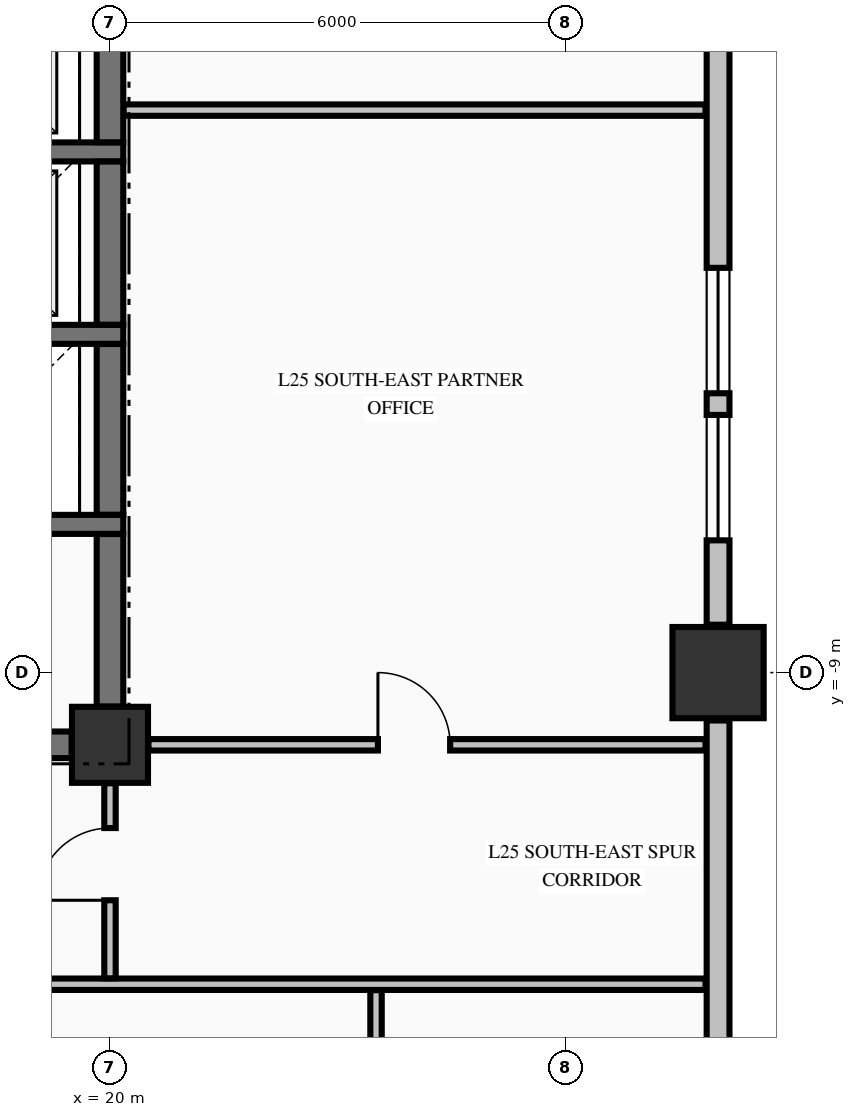
"""IFC4 building model, lengths in metres.
Left out: names, types, materials, properties, quantities, classifications, styles, units other than length and angle.
Written with IfcOpenShell. Run it as: python <this file> out.ifc"""

import sys

from ifc_helpers import new_model, si_unit, direction, frame, frame_2d, origin, origin_2d, place, context, subcontext, project, spatial, rectangle, extrude, element, fill, save


model = new_model("IFC4")
c1 = context("Model", 3, precision=1e-05, world=origin(), true_north=direction((0.0, 1.0)))
c2 = subcontext(c1, "Body", "Model", "MODEL_VIEW")
j1 = project(units=[si_unit("LENGTHUNIT", "METRE"), si_unit("PLANEANGLEUNIT", "RADIAN")], contexts=[c1])
p1 = place(None, origin())
s1 = spatial("IfcSite", under=j1, at=p1, CompositionType="ELEMENT")
p2 = place(p1, origin())
s2 = spatial("IfcBuilding", under=s1, at=p2, CompositionType="ELEMENT")
p3 = place(p2, frame((0.0, 0.0, 102.07)))
s3 = spatial("IfcBuildingStorey", under=s2, at=p3, CompositionType="ELEMENT", Elevation=102.07)
p4 = place(p3, frame((28.0, -9.0, -0.25), z_axis=(0.0, 0.0, 1.0), x_axis=(1.0, 0.0, 0.0)))
e1 = element("IfcColumn", 1, at=p4, inside=s3, PredefinedType="COLUMN", context=c2, shape_type="SweptSolid", body=[
    extrude(rectangle(XDim=1.2, YDim=1.2, at=origin_2d()), origin(), (0.0, 0.0, 1.0), 3.57),
])
p5 = place(p3, frame((20.0, -9.95, -0.25), z_axis=(0.0, 0.0, 1.0), x_axis=(1.0, 0.0, 0.0)))
e2 = element("IfcColumn", 2, at=p5, inside=s3, PredefinedType="COLUMN", context=c2, shape_type="SweptSolid", body=[
    extrude(rectangle(XDim=1.0, YDim=1.0, at=origin_2d()), origin(), (0.0, 0.0, 1.0), 3.57),
])
p6 = place(p3, frame((28.0, -20.37, 0.0), z_axis=(0.0, 0.0, 1.0), x_axis=(0.0, 1.0, 0.0)))
e3 = element("IfcWall", 3, at=p6, inside=s3, PredefinedType="STANDARD", context=c2, shape_type="SweptSolid", body=[
    extrude(rectangle(XDim=10.74, YDim=0.3, at=frame_2d((5.37, 0.0))), origin(), (0.0, 0.0, 1.0), 2.712),
])
p7 = place(p3, frame((28.0, -8.37, 0.0), z_axis=(0.0, 0.0, 1.0), x_axis=(0.0, 1.0, 0.0)))
e4 = element("IfcWall", 4, at=p7, inside=s3, PredefinedType="STANDARD", context=c2, shape_type="SweptSolid", body=[
    extrude(rectangle(XDim=7.74, YDim=0.3, at=frame_2d((3.87, 0.0))), origin(), (0.0, 0.0, 1.0), 2.712),
])
p8 = place(p7, frame((1.11, 0.0, 0.8)))
e5 = element("IfcOpeningElement", 5, at=p8, cuts=e4, PredefinedType="OPENING", context=c2, shape_type="SweptSolid", body=[
    extrude(rectangle(XDim=1.65, YDim=1.7, at=frame_2d((0.825, 0.85))), frame((0.0, 0.16, 0.0), z_axis=(0.0, -1.0, 0.0), x_axis=(1.0, 0.0, 0.0)), (0.0, 0.0, 1.0), 0.32),
])
p9 = place(p7, frame((3.045, 0.0, 0.8)))
e6 = element("IfcOpeningElement", 6, at=p9, cuts=e4, PredefinedType="OPENING", context=c2, shape_type="SweptSolid", body=[
    extrude(rectangle(XDim=1.65, YDim=1.7, at=frame_2d((0.825, 0.85))), frame((0.0, 0.16, 0.0), z_axis=(0.0, -1.0, 0.0), x_axis=(1.0, 0.0, 0.0)), (0.0, 0.0, 1.0), 0.32),
])
p10 = place(p3, frame((14.7, -9.95, 0.0), z_axis=(0.0, 0.0, 1.0), x_axis=(1.0, 0.0, 0.0)))
e7 = element("IfcWall", 7, at=p10, inside=s3, PredefinedType="SHEAR", context=c2, shape_type="SweptSolid", body=[
    extrude(rectangle(XDim=4.796, YDim=0.35, at=frame_2d((2.398, 0.0))), origin(), (0.0, 0.0, 1.0), 3.32),
])
p11 = place(p10, frame((0.65, 0.0, 0.0)))
e8 = element("IfcOpeningElement", 8, at=p11, cuts=e7, PredefinedType="OPENING", context=c2, shape_type="SweptSolid", body=[
    extrude(rectangle(XDim=1.2, YDim=2.15, at=frame_2d((0.6, 1.075))), frame((0.0, 0.185, 0.0), z_axis=(0.0, -1.0, 0.0), x_axis=(1.0, 0.0, 0.0)), (0.0, 0.0, 1.0), 0.37),
])
for number, where, z_axis, x_axis in (
    (9, (17.025, -7.05, 0.0), (0.0, 0.0, 1.0), (1.0, 0.0, 0.0)),
    (10, (17.025, -4.55, 0.0), (0.0, 0.0, 1.0), (1.0, 0.0, 0.0)),
    (11, (17.025, -2.15, 0.0), (0.0, 0.0, 1.0), (1.0, 0.0, 0.0)),
):
    element("IfcWall", number, at=place(p3, frame(where, z_axis=z_axis, x_axis=x_axis)), inside=s3, PredefinedType="SOLIDWALL", context=c2, shape_type="SweptSolid", body=[
        extrude(rectangle(XDim=3.15, YDim=0.25, at=frame_2d((1.575, 0.0))), origin(), (0.0, 0.0, 1.0), 3.32),
    ])
p12 = place(p3, frame((-22.835, -13.1, 0.0), z_axis=(0.0, 0.0, 1.0), x_axis=(1.0, 0.0, 0.0)))
e12 = element("IfcWall", 12, at=p12, inside=s3, PredefinedType="PARTITIONING", context=c2, shape_type="SweptSolid", body=[
    extrude(rectangle(XDim=50.67, YDim=0.15, at=frame_2d((25.335, 0.0))), origin(), (0.0, 0.0, 1.0), 3.32),
])
p13 = place(p12, frame((8.96, 0.0, 0.0)))
e13 = element("IfcOpeningElement", 13, at=p13, cuts=e12, PredefinedType="OPENING", context=c2, shape_type="SweptSolid", body=[
    extrude(rectangle(XDim=1.05, YDim=2.15, at=frame_2d((0.525, 1.075))), frame((0.0, 0.085, 0.0), z_axis=(0.0, -1.0, 0.0), x_axis=(1.0, 0.0, 0.0)), (0.0, 0.0, 1.0), 0.17),
])
p14 = place(p12, frame((20.61, 0.0, 0.0)))
e14 = element("IfcOpeningElement", 14, at=p14, cuts=e12, PredefinedType="OPENING", context=c2, shape_type="SweptSolid", body=[
    extrude(rectangle(XDim=1.05, YDim=2.15, at=frame_2d((0.525, 1.075))), frame((0.0, 0.085, 0.0), z_axis=(0.0, -1.0, 0.0), x_axis=(1.0, 0.0, 0.0)), (0.0, 0.0, 1.0), 0.17),
])
p15 = place(p12, frame((28.76, 0.0, 0.0)))
e15 = element("IfcOpeningElement", 15, at=p15, cuts=e12, PredefinedType="OPENING", context=c2, shape_type="SweptSolid", body=[
    extrude(rectangle(XDim=1.05, YDim=2.15, at=frame_2d((0.525, 1.075))), frame((0.0, 0.085, 0.0), z_axis=(0.0, -1.0, 0.0), x_axis=(1.0, 0.0, 0.0)), (0.0, 0.0, 1.0), 0.17),
])
p16 = place(p3, frame((20.506, -9.95, 0.0), z_axis=(0.0, 0.0, 1.0), x_axis=(1.0, 0.0, 0.0)))
e16 = element("IfcWall", 16, at=p16, inside=s3, PredefinedType="PARTITIONING", context=c2, shape_type="SweptSolid", body=[
    extrude(rectangle(XDim=7.329, YDim=0.15, at=frame_2d((3.665, 0.0))), origin(), (0.0, 0.0, 1.0), 3.32),
])
p17 = place(p16, frame((3.019, 0.0, 0.0)))
e17 = element("IfcOpeningElement", 17, at=p17, cuts=e16, PredefinedType="OPENING", context=c2, shape_type="SweptSolid", body=[
    extrude(rectangle(XDim=0.95, YDim=2.15, at=frame_2d((0.475, 1.075))), frame((0.0, 0.085, 0.0), z_axis=(0.0, -1.0, 0.0), x_axis=(1.0, 0.0, 0.0)), (0.0, 0.0, 1.0), 0.17),
])
p18 = place(p3, frame((20.178, -1.6, 0.0), z_axis=(0.0, 0.0, 1.0), x_axis=(1.0, 0.0, 0.0)))
e18 = element("IfcWall", 18, at=p18, inside=s3, PredefinedType="PARTITIONING", context=c2, shape_type="SweptSolid", body=[
    extrude(rectangle(XDim=7.657, YDim=0.15, at=frame_2d((3.829, 0.0))), origin(), (0.0, 0.0, 1.0), 3.32),
])
p19 = place(p3, frame((20.0, -9.446, 0.0), z_axis=(0.0, 0.0, 1.0), x_axis=(0.0, 1.0, 0.0)))
e19 = element("IfcWall", 19, at=p19, inside=s3, PredefinedType="SHEAR", context=c2, shape_type="SweptSolid", body=[
    extrude(rectangle(XDim=2.269, YDim=0.35, at=frame_2d((1.135, 0.0))), origin(), (0.0, 0.0, 1.0), 3.32),
])
p20 = place(p3, frame((20.0, -6.923, 0.0), z_axis=(0.0, 0.0, 1.0), x_axis=(0.0, 1.0, 0.0)))
e20 = element("IfcWall", 20, at=p20, inside=s3, PredefinedType="SHEAR", context=c2, shape_type="SweptSolid", body=[
    extrude(rectangle(XDim=2.246, YDim=0.35, at=frame_2d((1.123, 0.0))), origin(), (0.0, 0.0, 1.0), 3.32),
])
p21 = place(p3, frame((20.0, -4.423, 0.0), z_axis=(0.0, 0.0, 1.0), x_axis=(0.0, 1.0, 0.0)))
e21 = element("IfcWall", 21, at=p21, inside=s3, PredefinedType="SHEAR", context=c2, shape_type="SweptSolid", body=[
    extrude(rectangle(XDim=2.146, YDim=0.35, at=frame_2d((1.073, 0.0))), origin(), (0.0, 0.0, 1.0), 3.32),
])
p22 = place(p3, frame((20.0, -2.023, 0.0), z_axis=(0.0, 0.0, 1.0), x_axis=(0.0, 1.0, 0.0)))
e22 = element("IfcWall", 22, at=p22, inside=s3, PredefinedType="SHEAR", context=c2, shape_type="SweptSolid", body=[
    extrude(rectangle(XDim=1.519, YDim=0.35, at=frame_2d((0.76, 0.0))), origin(), (0.0, 0.0, 1.0), 3.32),
])
p23 = place(p3, frame((20.0, -13.022, 0.0), z_axis=(0.0, 0.0, 1.0), x_axis=(0.0, 1.0, 0.0)))
e23 = element("IfcWall", 23, at=p23, inside=s3, PredefinedType="PARTITIONING", context=c2, shape_type="SweptSolid", body=[
    extrude(rectangle(XDim=2.566, YDim=0.15, at=frame_2d((1.283, 0.0))), origin(), (0.0, 0.0, 1.0), 2.81),
])
p24 = place(p23, frame((1.027, 0.0, 0.0)))
e24 = element("IfcOpeningElement", 24, at=p24, cuts=e23, PredefinedType="OPENING", context=c2, shape_type="SweptSolid", body=[
    extrude(rectangle(XDim=0.95, YDim=2.15, at=frame_2d((0.475, 1.075))), frame((0.0, 0.085, 0.0), z_axis=(0.0, -1.0, 0.0), x_axis=(1.0, 0.0, 0.0)), (0.0, 0.0, 1.0), 0.17),
])
p25 = place(p3, frame((23.5, -20.394, 0.0), z_axis=(0.0, 0.0, 1.0), x_axis=(0.0, 1.0, 0.0)))
e25 = element("IfcWall", 25, at=p25, inside=s3, PredefinedType="PARTITIONING", context=c2, shape_type="SweptSolid", body=[
    extrude(rectangle(XDim=7.216, YDim=0.15, at=frame_2d((3.608, 0.0))), origin(), (0.0, 0.0, 1.0), 3.32),
])
p26 = place(p8, origin())
e26 = element("IfcWindow", 26, at=p26, inside=s3, PartitioningType="SINGLE_PANEL", PredefinedType="WINDOW", context=c2, shape_type="SweptSolid", body=[
    extrude(rectangle(XDim=1.65, YDim=1.7, at=frame_2d((0.825, 0.85))), frame((0.0, 0.03, 0.0), z_axis=(0.0, -1.0, 0.0), x_axis=(1.0, 0.0, 0.0)), (0.0, 0.0, 1.0), 0.06),
])
fill(e5, e26)
p27 = place(p9, origin())
e27 = element("IfcWindow", 27, at=p27, inside=s3, PartitioningType="SINGLE_PANEL", PredefinedType="WINDOW", context=c2, shape_type="SweptSolid", body=[
    extrude(rectangle(XDim=1.65, YDim=1.7, at=frame_2d((0.825, 0.85))), frame((0.0, 0.03, 0.0), z_axis=(0.0, -1.0, 0.0), x_axis=(1.0, 0.0, 0.0)), (0.0, 0.0, 1.0), 0.06),
])
fill(e6, e27)
p28 = place(p24, origin())
e28 = element("IfcDoor", 28, at=p28, inside=s3, OperationType="SINGLE_SWING_LEFT", PredefinedType="DOOR", context=c2, shape_type="SweptSolid", body=[
    extrude(rectangle(XDim=0.95, YDim=2.15, at=frame_2d((0.475, 1.075))), frame((0.0, 0.025, 0.0), z_axis=(0.0, -1.0, 0.0), x_axis=(1.0, 0.0, 0.0)), (0.0, 0.0, 1.0), 0.05),
])
fill(e24, e28)
p29 = place(p17, origin())
e29 = element("IfcDoor", 29, at=p29, inside=s3, OperationType="SINGLE_SWING_LEFT", PredefinedType="DOOR", context=c2, shape_type="SweptSolid", body=[
    extrude(rectangle(XDim=0.95, YDim=2.15, at=frame_2d((0.475, 1.075))), frame((0.0, 0.025, 0.0), z_axis=(0.0, -1.0, 0.0), x_axis=(1.0, 0.0, 0.0)), (0.0, 0.0, 1.0), 0.05),
])
fill(e17, e29)
save(model, sys.argv[1])
